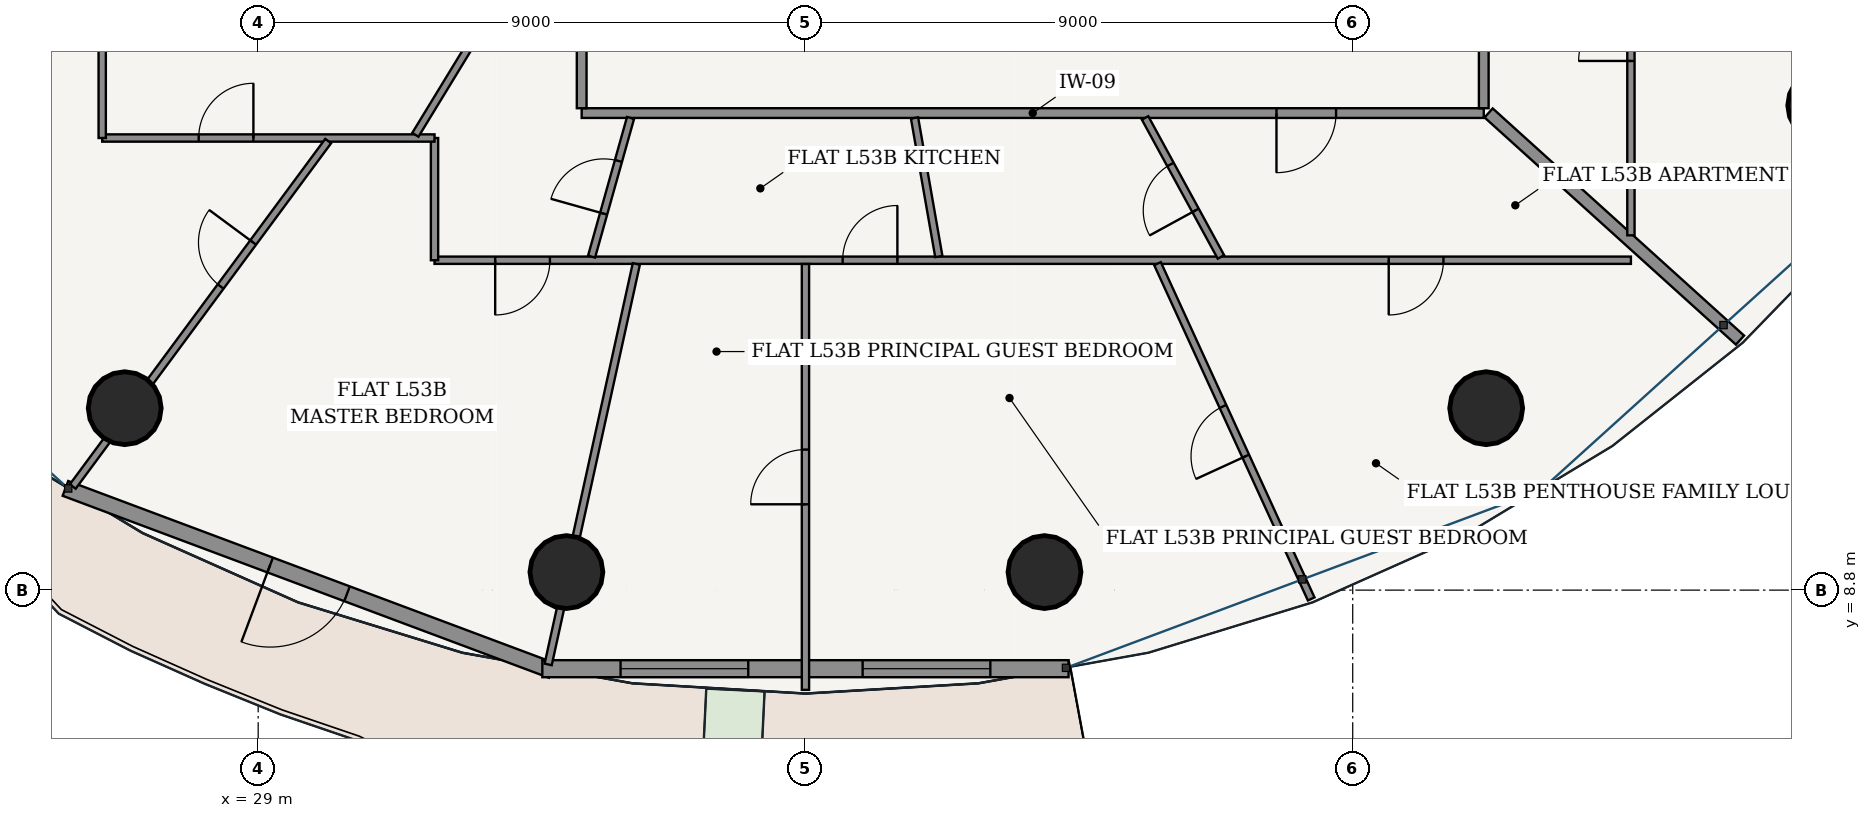
"""IFC4 building model, lengths in metres.
Left out: names, types, materials, properties, quantities, classifications, styles, units other than length and angle.
Written with IfcOpenShell. Run it as: python <this file> out.ifc"""

import sys

from ifc_helpers import new_model, si_unit, direction, frame, frame_2d, origin, origin_2d, place, context, subcontext, project, spatial, rectangle, hollow_circle, extrude, source, transform, mapped, element, fill, save


model = new_model("IFC4")
c1 = context("Model", 3, precision=1e-05, world=origin(), true_north=direction((-0.2419218956, 0.970295726276)))
c2 = subcontext(c1, "Body", "Model", "MODEL_VIEW")
j1 = project(units=[si_unit("LENGTHUNIT", "METRE"), si_unit("PLANEANGLEUNIT", "RADIAN")], contexts=[c1])
p1 = place(None, origin())
s1 = spatial("IfcSite", under=j1, at=p1, CompositionType="ELEMENT")
p2 = place(p1, origin())
s2 = spatial("IfcBuilding", under=s1, at=p2, CompositionType="ELEMENT")
p3 = place(p2, frame((0.0, 0.0, 202.3)))
s3 = spatial("IfcBuildingStorey", under=s2, at=p3, CompositionType="ELEMENT", Elevation=202.3)
for number, where, z_axis, x_axis in (
    (1, (26.805, 11.792, 0.0), (0.0, 0.0, 1.0), (1.0, 0.0, 0.0)),
    (2, (34.069, 9.097, 0.0), (0.0, 0.0, 1.0), (1.0, 0.0, 0.0)),
    (3, (41.931, 9.097, 0.0), (0.0, 0.0, 1.0), (1.0, 0.0, 0.0)),
    (4, (49.195, 11.792, 0.0), (0.0, 0.0, 1.0), (1.0, 0.0, 0.0)),
    (5, (54.754, 16.772, 0.0), (0.0, 0.0, 1.0), (1.0, 0.0, 0.0)),
):
    element("IfcColumn", number, at=place(p3, frame(where, z_axis=z_axis, x_axis=x_axis)), inside=s3, PredefinedType="COLUMN", context=c2, shape_type="SweptSolid", body=[
        extrude(hollow_circle(Radius=0.6, WallThickness=0.038, at=origin_2d()), origin(), (0.0, 0.0, 1.0), 3.7),
    ])
p4 = place(p3, frame((25.83, 10.473, 0.0), z_axis=(0.0, 0.0, 1.0), x_axis=(0.936556918375, -0.350515532672, 0.0)))
e6 = element("IfcWall", 6, at=p4, inside=s3, PredefinedType="SOLIDWALL", context=c2, shape_type="SweptSolid", body=[
    extrude(rectangle(XDim=8.539, YDim=0.26, at=frame_2d((4.27, 0.0))), origin(), (0.0, 0.0, 1.0), 3.435),
])
p5 = place(p4, frame((3.594, 0.0, 0.0)))
e7 = element("IfcOpeningElement", 7, at=p5, cuts=e6, PredefinedType="OPENING", context=c2, shape_type="SweptSolid", body=[
    extrude(rectangle(XDim=1.35, YDim=2.2, at=frame_2d((0.675, 1.1))), frame((0.0, 0.14, 0.0), z_axis=(0.0, -1.0, 0.0), x_axis=(1.0, 0.0, 0.0)), (0.0, 0.0, 1.0), 0.28),
])
p6 = place(p3, frame((33.673, 7.508, 0.0), z_axis=(0.0, 0.0, 1.0), x_axis=(1.0, 0.0, 0.0)))
e8 = element("IfcWall", 8, at=p6, inside=s3, PredefinedType="SOLIDWALL", context=c2, shape_type="SweptSolid", body=[
    extrude(rectangle(XDim=8.654, YDim=0.28, at=frame_2d((4.327, 0.0))), origin(), (0.0, 0.0, 1.0), 3.435),
])
p7 = place(p6, frame((1.287, 0.0, 0.85)))
e9 = element("IfcOpeningElement", 9, at=p7, cuts=e8, PredefinedType="OPENING", context=c2, shape_type="SweptSolid", body=[
    extrude(rectangle(XDim=2.1, YDim=1.95, at=frame_2d((1.05, 0.975))), frame((0.0, 0.15, 0.0), z_axis=(0.0, -1.0, 0.0), x_axis=(1.0, 0.0, 0.0)), (0.0, 0.0, 1.0), 0.3),
])
p8 = place(p6, frame((5.268, 0.0, 0.85)))
e10 = element("IfcOpeningElement", 10, at=p8, cuts=e8, PredefinedType="OPENING", context=c2, shape_type="SweptSolid", body=[
    extrude(rectangle(XDim=2.1, YDim=1.95, at=frame_2d((1.05, 0.975))), frame((0.0, 0.15, 0.0), z_axis=(0.0, -1.0, 0.0), x_axis=(1.0, 0.0, 0.0)), (0.0, 0.0, 1.0), 0.3),
])
p9 = place(p3, frame((34.32, 16.645, 0.0), z_axis=(0.0, 0.0, 1.0), x_axis=(1.0, 0.0, 0.0)))
e11 = element("IfcWall", 11, at=p9, inside=s3, PredefinedType="PARTITIONING", context=c2, shape_type="SweptSolid", body=[
    extrude(rectangle(XDim=14.835, YDim=0.16, at=frame_2d((7.417, 0.0))), origin(), (0.0, 0.0, 1.0), 2.951),
])
p10 = place(p9, frame((11.426, 0.0, 0.0)))
e12 = element("IfcOpeningElement", 12, at=p10, cuts=e11, PredefinedType="OPENING", context=c2, shape_type="SweptSolid", body=[
    extrude(rectangle(XDim=0.98, YDim=2.2, at=frame_2d((0.49, 1.1))), frame((0.0, 0.09, 0.0), z_axis=(0.0, -1.0, 0.0), x_axis=(1.0, 0.0, 0.0)), (0.0, 0.0, 1.0), 0.18),
])
p11 = place(p3, frame((34.32, 16.725, 0.0), z_axis=(0.0, 0.0, 1.0), x_axis=(0.0, 1.0, 0.0)))
e13 = element("IfcWall", 13, at=p11, inside=s3, PredefinedType="PARTITIONING", context=c2, shape_type="SweptSolid", body=[
    extrude(rectangle(XDim=1.85, YDim=0.16, at=frame_2d((0.925, 0.0))), origin(), (0.0, 0.0, 1.0), 3.435),
])
p12 = place(p3, frame((49.155, 16.725, 0.0), z_axis=(0.0, 0.0, 1.0), x_axis=(0.0, 1.0, 0.0)))
e14 = element("IfcWall", 14, at=p12, inside=s3, PredefinedType="PARTITIONING", context=c2, shape_type="SweptSolid", body=[
    extrude(rectangle(XDim=18.3, YDim=0.16, at=frame_2d((9.15, 0.0))), origin(), (0.0, 0.0, 1.0), 2.951),
])
p13 = place(p12, frame((15.302, 0.0, 0.0)))
e15 = element("IfcOpeningElement", 15, at=p13, cuts=e14, PredefinedType="OPENING", context=c2, shape_type="SweptSolid", body=[
    extrude(rectangle(XDim=0.98, YDim=2.2, at=frame_2d((0.49, 1.1))), frame((0.0, 0.09, 0.0), z_axis=(0.0, -1.0, 0.0), x_axis=(1.0, 0.0, 0.0)), (0.0, 0.0, 1.0), 0.18),
])
p14 = place(p3, frame((51.575, 14.225, 0.0), z_axis=(0.0, 0.0, 1.0), x_axis=(-1.0, 0.0, 0.0)))
e16 = element("IfcWall", 16, at=p14, inside=s3, PredefinedType="PARTITIONING", context=c2, shape_type="SweptSolid", body=[
    extrude(rectangle(XDim=19.675, YDim=0.12, at=frame_2d((9.837, 0.0))), origin(), (0.0, 0.0, 1.0), 2.951),
])
p15 = place(p14, frame((3.083, 0.0, 0.0)))
e17 = element("IfcOpeningElement", 17, at=p15, cuts=e16, PredefinedType="OPENING", context=c2, shape_type="SweptSolid", body=[
    extrude(rectangle(XDim=0.9, YDim=2.15, at=frame_2d((0.45, 1.075))), frame((0.0, 0.07, 0.0), z_axis=(0.0, -1.0, 0.0), x_axis=(1.0, 0.0, 0.0)), (0.0, 0.0, 1.0), 0.14),
])
p16 = place(p14, frame((12.063, 0.0, 0.0)))
e18 = element("IfcOpeningElement", 18, at=p16, cuts=e16, PredefinedType="OPENING", context=c2, shape_type="SweptSolid", body=[
    extrude(rectangle(XDim=0.9, YDim=2.15, at=frame_2d((0.45, 1.075))), frame((0.0, 0.07, 0.0), z_axis=(0.0, -1.0, 0.0), x_axis=(1.0, 0.0, 0.0)), (0.0, 0.0, 1.0), 0.14),
])
p17 = place(p14, frame((17.777, 0.0, 0.0)))
e19 = element("IfcOpeningElement", 19, at=p17, cuts=e16, PredefinedType="OPENING", context=c2, shape_type="SweptSolid", body=[
    extrude(rectangle(XDim=0.9, YDim=2.15, at=frame_2d((0.45, 1.075))), frame((0.0, 0.07, 0.0), z_axis=(0.0, -1.0, 0.0), x_axis=(1.0, 0.0, 0.0)), (0.0, 0.0, 1.0), 0.14),
])
p18 = place(p3, frame((31.9, 14.225, 0.0), z_axis=(0.0, 0.0, 1.0), x_axis=(0.0, 1.0, 0.0)))
e20 = element("IfcWall", 20, at=p18, inside=s3, PredefinedType="PARTITIONING", context=c2, shape_type="SweptSolid", body=[
    extrude(rectangle(XDim=2.01, YDim=0.12, at=frame_2d((1.005, 0.0))), origin(), (0.0, 0.0, 1.0), 3.11),
])
p19 = place(p3, frame((31.9, 16.235, 0.0), z_axis=(0.0, 0.0, 1.0), x_axis=(-1.0, 0.0, 0.0)))
e21 = element("IfcWall", 21, at=p19, inside=s3, PredefinedType="PARTITIONING", context=c2, shape_type="SweptSolid", body=[
    extrude(rectangle(XDim=5.465, YDim=0.12, at=frame_2d((2.732, 0.0))), origin(), (0.0, 0.0, 1.0), 2.951),
])
p20 = place(p19, frame((2.979, 0.0, 0.0)))
e22 = element("IfcOpeningElement", 22, at=p20, cuts=e21, PredefinedType="OPENING", context=c2, shape_type="SweptSolid", body=[
    extrude(rectangle(XDim=0.9, YDim=2.15, at=frame_2d((0.45, 1.075))), frame((0.0, 0.07, 0.0), z_axis=(0.0, -1.0, 0.0), x_axis=(1.0, 0.0, 0.0)), (0.0, 0.0, 1.0), 0.14),
])
p21 = place(p3, frame((26.435, 16.235, 0.0), z_axis=(0.0, 0.0, 1.0), x_axis=(0.0, 1.0, 0.0)))
e23 = element("IfcWall", 23, at=p21, inside=s3, PredefinedType="PARTITIONING", context=c2, shape_type="SweptSolid", body=[
    extrude(rectangle(XDim=5.665, YDim=0.12, at=frame_2d((2.833, 0.0))), origin(), (0.0, 0.0, 1.0), 2.951),
])
p22 = place(p21, frame((3.362, 0.0, 0.0)))
e24 = element("IfcOpeningElement", 24, at=p22, cuts=e23, PredefinedType="OPENING", context=c2, shape_type="SweptSolid", body=[
    extrude(rectangle(XDim=0.86, YDim=2.15, at=frame_2d((0.43, 1.075))), frame((0.0, 0.07, 0.0), z_axis=(0.0, -1.0, 0.0), x_axis=(1.0, 0.0, 0.0)), (0.0, 0.0, 1.0), 0.14),
])
p23 = place(p3, frame((30.151, 16.185, 0.0), z_axis=(0.0, 0.0, 1.0), x_axis=(-0.594540664599, -0.804065543434, 0.0)))
e25 = element("IfcWall", 25, at=p23, inside=s3, PredefinedType="PARTITIONING", context=c2, shape_type="SweptSolid", body=[
    extrude(rectangle(XDim=7.066, YDim=0.12, at=frame_2d((3.533, 0.0))), origin(), (0.0, 0.0, 1.0), 2.951),
])
p24 = place(p23, frame((2.075, 0.0, 0.0)))
e26 = element("IfcOpeningElement", 26, at=p24, cuts=e25, PredefinedType="OPENING", context=c2, shape_type="SweptSolid", body=[
    extrude(rectangle(XDim=0.9, YDim=2.15, at=frame_2d((0.45, 1.075))), frame((0.0, 0.07, 0.0), z_axis=(0.0, -1.0, 0.0), x_axis=(1.0, 0.0, 0.0)), (0.0, 0.0, 1.0), 0.14),
])
p25 = place(p3, frame((35.219, 14.165, 0.0), z_axis=(0.0, 0.0, 1.0), x_axis=(-0.214959845337, -0.976622887758, 0.0)))
e27 = element("IfcWall", 27, at=p25, inside=s3, PredefinedType="PARTITIONING", context=c2, shape_type="SweptSolid", body=[
    extrude(rectangle(XDim=6.744, YDim=0.12, at=frame_2d((3.372, 0.0))), origin(), (0.0, 0.0, 1.0), 2.951),
])
p26 = place(p3, frame((38.0, 14.163, 0.0), z_axis=(0.0, 0.0, 1.0), x_axis=(0.0, -1.0, 0.0)))
e28 = element("IfcWall", 28, at=p26, inside=s3, PredefinedType="PARTITIONING", context=c2, shape_type="SweptSolid", body=[
    extrude(rectangle(XDim=7.003, YDim=0.12, at=frame_2d((3.501, 0.0))), origin(), (0.0, 0.0, 1.0), 2.951),
])
p27 = place(p26, frame((3.052, 0.0, 0.0)))
e29 = element("IfcOpeningElement", 29, at=p27, cuts=e28, PredefinedType="OPENING", context=c2, shape_type="SweptSolid", body=[
    extrude(rectangle(XDim=0.9, YDim=2.15, at=frame_2d((0.45, 1.075))), frame((0.0, 0.07, 0.0), z_axis=(0.0, -1.0, 0.0), x_axis=(1.0, 0.0, 0.0)), (0.0, 0.0, 1.0), 0.14),
])
p28 = place(p3, frame((43.79, 14.169, 0.0), z_axis=(0.0, 0.0, 1.0), x_axis=(0.416687974363, -0.909049576218, 0.0)))
e30 = element("IfcWall", 30, at=p28, inside=s3, PredefinedType="PARTITIONING", context=c2, shape_type="SweptSolid", body=[
    extrude(rectangle(XDim=6.065, YDim=0.12, at=frame_2d((3.033, 0.0))), origin(), (0.0, 0.0, 1.0), 2.951),
])
p29 = place(p28, frame((2.583, 0.0, 0.0)))
e31 = element("IfcOpeningElement", 31, at=p29, cuts=e30, PredefinedType="OPENING", context=c2, shape_type="SweptSolid", body=[
    extrude(rectangle(XDim=0.9, YDim=2.15, at=frame_2d((0.45, 1.075))), frame((0.0, 0.07, 0.0), z_axis=(0.0, -1.0, 0.0), x_axis=(1.0, 0.0, 0.0)), (0.0, 0.0, 1.0), 0.14),
])
p30 = place(p3, frame((32.981, 18.575, 0.0), z_axis=(0.0, 0.0, 1.0), x_axis=(-0.520926540997, -0.853601510592, 0.0)))
e32 = element("IfcWall", 32, at=p30, inside=s3, PredefinedType="PARTITIONING", context=c2, shape_type="SweptSolid", body=[
    extrude(rectangle(XDim=2.679, YDim=0.12, at=frame_2d((1.34, 0.0))), origin(), (0.0, 0.0, 1.0), 3.435),
])
p31 = place(p3, frame((35.124, 16.565, 0.0), z_axis=(0.0, 0.0, 1.0), x_axis=(-0.270566477163, -0.962701293982, 0.0)))
e33 = element("IfcWall", 33, at=p31, inside=s3, PredefinedType="PARTITIONING", context=c2, shape_type="SweptSolid", body=[
    extrude(rectangle(XDim=2.369, YDim=0.12, at=frame_2d((1.184, 0.0))), origin(), (0.0, 0.0, 1.0), 3.435),
])
p32 = place(p31, frame((0.734, 0.0, 0.0)))
e34 = element("IfcOpeningElement", 34, at=p32, cuts=e33, PredefinedType="OPENING", context=c2, shape_type="SweptSolid", body=[
    extrude(rectangle(XDim=0.9, YDim=2.15, at=frame_2d((0.45, 1.075))), frame((0.0, 0.07, 0.0), z_axis=(0.0, -1.0, 0.0), x_axis=(1.0, 0.0, 0.0)), (0.0, 0.0, 1.0), 0.14),
])
p33 = place(p3, frame((39.794, 16.565, 0.0), z_axis=(0.0, 0.0, 1.0), x_axis=(0.172641422295, -0.984984740647, 0.0)))
e35 = element("IfcWall", 35, at=p33, inside=s3, PredefinedType="PARTITIONING", context=c2, shape_type="SweptSolid", body=[
    extrude(rectangle(XDim=2.313, YDim=0.12, at=frame_2d((1.157, 0.0))), origin(), (0.0, 0.0, 1.0), 3.435),
])
p34 = place(p3, frame((43.585, 16.565, 0.0), z_axis=(0.0, 0.0, 1.0), x_axis=(0.479068920965, -0.877777288932, 0.0)))
e36 = element("IfcWall", 36, at=p34, inside=s3, PredefinedType="PARTITIONING", context=c2, shape_type="SweptSolid", body=[
    extrude(rectangle(XDim=2.604, YDim=0.12, at=frame_2d((1.302, 0.0))), origin(), (0.0, 0.0, 1.0), 3.11),
])
p35 = place(p34, frame((0.872, 0.0, 0.0)))
e37 = element("IfcOpeningElement", 37, at=p35, cuts=e36, PredefinedType="OPENING", context=c2, shape_type="SweptSolid", body=[
    extrude(rectangle(XDim=0.86, YDim=2.15, at=frame_2d((0.43, 1.075))), frame((0.0, 0.07, 0.0), z_axis=(0.0, -1.0, 0.0), x_axis=(1.0, 0.0, 0.0)), (0.0, 0.0, 1.0), 0.14),
])
p36 = place(p3, frame((49.235, 16.647, 0.0), z_axis=(0.0, 0.0, 1.0), x_axis=(0.741935290449, -0.670471494387, 0.0)))
e38 = element("IfcWall", 38, at=p36, inside=s3, PredefinedType="PARTITIONING", context=c2, shape_type="SweptSolid", body=[
    extrude(rectangle(XDim=5.572, YDim=0.2, at=frame_2d((2.786, 0.0))), origin(), (0.0, 0.0, 1.0), 2.951),
])
p37 = place(p3, frame((51.575, 37.525, 0.0), z_axis=(0.0, 0.0, 1.0), x_axis=(0.0, -1.0, 0.0)))
e39 = element("IfcWall", 39, at=p37, inside=s3, PredefinedType="PARTITIONING", context=c2, shape_type="SweptSolid", body=[
    extrude(rectangle(XDim=22.89, YDim=0.12, at=frame_2d((11.445, 0.0))), origin(), (0.0, 0.0, 1.0), 2.951),
])
p38 = place(p37, frame((4.102, 0.0, 0.0)))
e40 = element("IfcOpeningElement", 40, at=p38, cuts=e39, PredefinedType="OPENING", context=c2, shape_type="SweptSolid", body=[
    extrude(rectangle(XDim=0.9, YDim=2.15, at=frame_2d((0.45, 1.075))), frame((0.0, 0.07, 0.0), z_axis=(0.0, -1.0, 0.0), x_axis=(1.0, 0.0, 0.0)), (0.0, 0.0, 1.0), 0.14),
])
p39 = place(p37, frame((19.163, 0.0, 0.0)))
e41 = element("IfcOpeningElement", 41, at=p39, cuts=e39, PredefinedType="OPENING", context=c2, shape_type="SweptSolid", body=[
    extrude(rectangle(XDim=0.86, YDim=2.15, at=frame_2d((0.43, 1.075))), frame((0.0, 0.07, 0.0), z_axis=(0.0, -1.0, 0.0), x_axis=(1.0, 0.0, 0.0)), (0.0, 0.0, 1.0), 0.14),
])
p40 = place(p37, frame((13.046, 0.0, 0.0)))
e42 = element("IfcOpeningElement", 42, at=p40, cuts=e39, PredefinedType="OPENING", context=c2, shape_type="SweptSolid", body=[
    extrude(rectangle(XDim=0.9, YDim=2.15, at=frame_2d((0.45, 1.075))), frame((0.0, 0.07, 0.0), z_axis=(0.0, -1.0, 0.0), x_axis=(1.0, 0.0, 0.0)), (0.0, 0.0, 1.0), 0.14),
])
m1 = source(origin(), c2, "Body", "SweptSolid", [
    extrude(rectangle(XDim=1.35, YDim=2.2, at=frame_2d((0.675, 1.1))), frame((0.0, 0.025, 0.0), z_axis=(0.0, -1.0, 0.0), x_axis=(1.0, 0.0, 0.0)), (0.0, 0.0, 1.0), 0.05),
])
p41 = place(p5, frame((1.35, 0.0, 0.0), z_axis=(0.0, 0.0, 1.0), x_axis=(-1.0, 0.0, 0.0)))
e43 = element("IfcDoor", 43, at=p41, inside=s3, OperationType="SINGLE_SWING_RIGHT", PredefinedType="DOOR", context=c2, shape_type="MappedRepresentation", body=[
    mapped(m1, transform((0.0, 0.0, 0.0), scale=1.0)),
])
fill(e7, e43)
m2 = source(origin(), c2, "Body", "SweptSolid", [
    extrude(rectangle(XDim=2.1, YDim=1.95, at=frame_2d((1.05, 0.975))), frame((0.0, 0.03, 0.0), z_axis=(0.0, -1.0, 0.0), x_axis=(1.0, 0.0, 0.0)), (0.0, 0.0, 1.0), 0.06),
])
p42 = place(p7, origin())
e44 = element("IfcWindow", 44, at=p42, inside=s3, PartitioningType="SINGLE_PANEL", PredefinedType="WINDOW", context=c2, shape_type="MappedRepresentation", body=[
    mapped(m2, transform((0.0, 0.0, 0.0), scale=1.0)),
])
fill(e9, e44)
p43 = place(p8, origin())
e45 = element("IfcWindow", 45, at=p43, inside=s3, PartitioningType="SINGLE_PANEL", PredefinedType="WINDOW", context=c2, shape_type="MappedRepresentation", body=[
    mapped(m2, transform((0.0, 0.0, 0.0), scale=1.0)),
])
fill(e10, e45)
m3 = source(origin(), c2, "Body", "SweptSolid", [
    extrude(rectangle(XDim=0.98, YDim=2.2, at=frame_2d((0.49, 1.1))), frame((0.0, 0.025, 0.0), z_axis=(0.0, -1.0, 0.0), x_axis=(1.0, 0.0, 0.0)), (0.0, 0.0, 1.0), 0.05),
])
p44 = place(p10, frame((0.98, 0.0, 0.0), z_axis=(0.0, 0.0, 1.0), x_axis=(-1.0, 0.0, 0.0)))
e46 = element("IfcDoor", 46, at=p44, inside=s3, OperationType="SINGLE_SWING_RIGHT", PredefinedType="DOOR", context=c2, shape_type="MappedRepresentation", body=[
    mapped(m3, transform((0.0, 0.0, 0.0), scale=1.0)),
])
fill(e12, e46)
m4 = source(origin(), c2, "Body", "SweptSolid", [
    extrude(rectangle(XDim=0.86, YDim=2.15, at=frame_2d((0.43, 1.075))), frame((0.0, 0.025, 0.0), z_axis=(0.0, -1.0, 0.0), x_axis=(1.0, 0.0, 0.0)), (0.0, 0.0, 1.0), 0.05),
])
p45 = place(p35, frame((0.86, 0.0, 0.0), z_axis=(0.0, 0.0, 1.0), x_axis=(-1.0, 0.0, 0.0)))
e47 = element("IfcDoor", 47, at=p45, inside=s3, OperationType="SINGLE_SWING_LEFT", PredefinedType="DOOR", context=c2, shape_type="MappedRepresentation", body=[
    mapped(m4, transform((0.0, 0.0, 0.0), scale=1.0)),
])
fill(e37, e47)
m5 = source(origin(), c2, "Body", "SweptSolid", [
    extrude(rectangle(XDim=0.9, YDim=2.15, at=frame_2d((0.45, 1.075))), frame((0.0, 0.025, 0.0), z_axis=(0.0, -1.0, 0.0), x_axis=(1.0, 0.0, 0.0)), (0.0, 0.0, 1.0), 0.05),
])
p46 = place(p15, origin())
e48 = element("IfcDoor", 48, at=p46, inside=s3, OperationType="SINGLE_SWING_RIGHT", PredefinedType="DOOR", context=c2, shape_type="MappedRepresentation", body=[
    mapped(m5, transform((0.0, 0.0, 0.0), scale=1.0)),
])
fill(e17, e48)
p47 = place(p29, frame((0.9, 0.0, 0.0), z_axis=(0.0, 0.0, 1.0), x_axis=(-1.0, 0.0, 0.0)))
e49 = element("IfcDoor", 49, at=p47, inside=s3, OperationType="SINGLE_SWING_LEFT", PredefinedType="DOOR", context=c2, shape_type="MappedRepresentation", body=[
    mapped(m5, transform((0.0, 0.0, 0.0), scale=1.0)),
])
fill(e31, e49)
p48 = place(p16, frame((0.9, 0.0, 0.0), z_axis=(0.0, 0.0, 1.0), x_axis=(-1.0, 0.0, 0.0)))
e50 = element("IfcDoor", 50, at=p48, inside=s3, OperationType="SINGLE_SWING_RIGHT", PredefinedType="DOOR", context=c2, shape_type="MappedRepresentation", body=[
    mapped(m5, transform((0.0, 0.0, 0.0), scale=1.0)),
])
fill(e18, e50)
p49 = place(p32, frame((0.9, 0.0, 0.0), z_axis=(0.0, 0.0, 1.0), x_axis=(-1.0, 0.0, 0.0)))
e51 = element("IfcDoor", 51, at=p49, inside=s3, OperationType="SINGLE_SWING_LEFT", PredefinedType="DOOR", context=c2, shape_type="MappedRepresentation", body=[
    mapped(m5, transform((0.0, 0.0, 0.0), scale=1.0)),
])
fill(e34, e51)
p50 = place(p17, origin())
e52 = element("IfcDoor", 52, at=p50, inside=s3, OperationType="SINGLE_SWING_RIGHT", PredefinedType="DOOR", context=c2, shape_type="MappedRepresentation", body=[
    mapped(m5, transform((0.0, 0.0, 0.0), scale=1.0)),
])
fill(e19, e52)
p51 = place(p27, frame((0.9, 0.0, 0.0), z_axis=(0.0, 0.0, 1.0), x_axis=(-1.0, 0.0, 0.0)))
e53 = element("IfcDoor", 53, at=p51, inside=s3, OperationType="SINGLE_SWING_LEFT", PredefinedType="DOOR", context=c2, shape_type="MappedRepresentation", body=[
    mapped(m5, transform((0.0, 0.0, 0.0), scale=1.0)),
])
fill(e29, e53)
p52 = place(p24, frame((0.9, 0.0, 0.0), z_axis=(0.0, 0.0, 1.0), x_axis=(-1.0, 0.0, 0.0)))
e54 = element("IfcDoor", 54, at=p52, inside=s3, OperationType="SINGLE_SWING_RIGHT", PredefinedType="DOOR", context=c2, shape_type="MappedRepresentation", body=[
    mapped(m5, transform((0.0, 0.0, 0.0), scale=1.0)),
])
fill(e26, e54)
p53 = place(p20, frame((0.9, 0.0, 0.0), z_axis=(0.0, 0.0, 1.0), x_axis=(-1.0, 0.0, 0.0)))
e55 = element("IfcDoor", 55, at=p53, inside=s3, OperationType="SINGLE_SWING_RIGHT", PredefinedType="DOOR", context=c2, shape_type="MappedRepresentation", body=[
    mapped(m5, transform((0.0, 0.0, 0.0), scale=1.0)),
])
fill(e22, e55)
p54 = place(p39, frame((0.86, 0.0, 0.0), z_axis=(0.0, 0.0, 1.0), x_axis=(-1.0, 0.0, 0.0)))
e56 = element("IfcDoor", 56, at=p54, inside=s3, OperationType="SINGLE_SWING_LEFT", PredefinedType="DOOR", context=c2, shape_type="MappedRepresentation", body=[
    mapped(m4, transform((0.0, 0.0, 0.0), scale=1.0)),
])
fill(e41, e56)
save(model, sys.argv[1])
